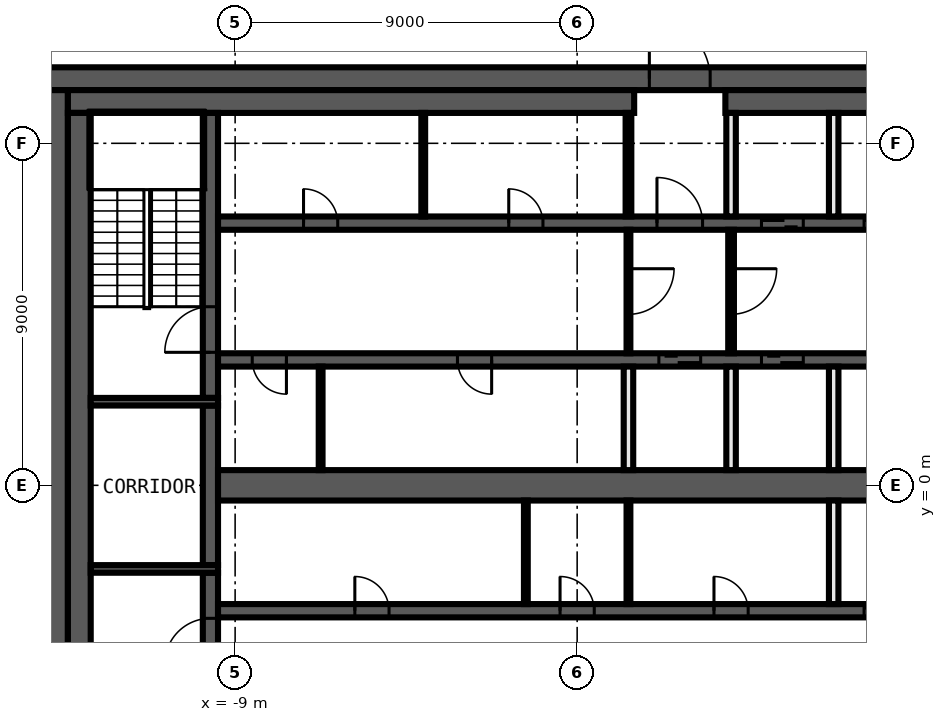
"""IFC4 building model, lengths in metres.
Left out: names, types, materials, properties, quantities, classifications, styles, units other than length and angle.
Written with IfcOpenShell. Run it as: python <this file> out.ifc"""

import sys

from ifc_helpers import new_model, si_unit, direction, frame, frame_2d, origin, place, context, subcontext, project, spatial, rectangle, extrude, element, fill, save


model = new_model("IFC4")
c1 = context("Model", 3, precision=1e-05, world=origin(), true_north=direction((0.0, 1.0)))
c2 = subcontext(c1, "Body", "Model", "MODEL_VIEW")
j1 = project(units=[si_unit("LENGTHUNIT", "METRE"), si_unit("PLANEANGLEUNIT", "RADIAN")], contexts=[c1])
p1 = place(None, origin())
s1 = spatial("IfcSite", under=j1, at=p1, CompositionType="ELEMENT")
p2 = place(p1, origin())
s2 = spatial("IfcBuilding", under=s1, at=p2, CompositionType="ELEMENT")
p3 = place(p2, frame((0.0, 0.0, 359.0)))
s3 = spatial("IfcBuildingStorey", under=s2, at=p3, CompositionType="ELEMENT", Elevation=359.0)
p4 = place(p3, frame((-11.138, 20.28, 0.0), z_axis=(0.0, 0.0, 1.0), x_axis=(-0.441342255748, -0.897338850876, 0.0)))
e1 = element("IfcWall", 1, at=p4, inside=s3, PredefinedType="SOLIDWALL", context=c2, shape_type="SweptSolid", body=[
    extrude(rectangle(XDim=28.805, YDim=0.25, at=frame_2d((14.403, 0.0))), origin(), (0.0, 0.0, 1.0), 3.8),
])
p5 = place(p3, frame((-14.0, 10.7, 0.0), z_axis=(0.0, 0.0, 1.0), x_axis=(1.0, 0.0, 0.0)))
e2 = element("IfcWall", 2, at=p5, inside=s3, PredefinedType="SHEAR", context=c2, shape_type="SweptSolid", body=[
    extrude(rectangle(XDim=28.0, YDim=0.6, at=frame_2d((14.0, 0.0))), origin(), (0.0, 0.0, 1.0), 3.8),
])
p6 = place(p5, frame((15.9, 0.0, 0.0)))
e3 = element("IfcOpeningElement", 3, at=p6, cuts=e2, PredefinedType="OPENING", context=c2, shape_type="SweptSolid", body=[
    extrude(rectangle(XDim=1.6, YDim=2.1, at=frame_2d((0.8, 1.05))), frame((0.0, 0.31, 0.0), z_axis=(0.0, -1.0, 0.0), x_axis=(1.0, 0.0, 0.0)), (0.0, 0.0, 1.0), 0.62),
])
p7 = place(p3, frame((-13.7, -10.4, 0.0), z_axis=(0.0, 0.0, 1.0), x_axis=(0.0, 1.0, 0.0)))
e4 = element("IfcWall", 4, at=p7, inside=s3, PredefinedType="SHEAR", context=c2, shape_type="SweptSolid", body=[
    extrude(rectangle(XDim=20.8, YDim=0.6, at=frame_2d((10.4, 0.0))), origin(), (0.0, 0.0, 1.0), 3.8),
])
p8 = place(p3, frame((-13.4, 10.1, 0.0), z_axis=(0.0, 0.0, 1.0), x_axis=(1.0, 0.0, 0.0)))
e5 = element("IfcWall", 5, at=p8, inside=s3, PredefinedType="SHEAR", context=c2, shape_type="SweptSolid", body=[
    extrude(rectangle(XDim=14.9, YDim=0.6, at=frame_2d((7.45, 0.0))), origin(), (0.0, 0.0, 1.0), 3.8),
])
p9 = place(p3, frame((3.9, 10.1, 0.0), z_axis=(0.0, 0.0, 1.0), x_axis=(1.0, 0.0, 0.0)))
e6 = element("IfcWall", 6, at=p9, inside=s3, PredefinedType="SHEAR", context=c2, shape_type="SweptSolid", body=[
    extrude(rectangle(XDim=9.5, YDim=0.6, at=frame_2d((4.75, 0.0))), origin(), (0.0, 0.0, 1.0), 3.8),
])
p10 = place(p3, frame((-13.1, -9.8, 0.0), z_axis=(0.0, 0.0, 1.0), x_axis=(0.0, 1.0, 0.0)))
e7 = element("IfcWall", 7, at=p10, inside=s3, PredefinedType="SHEAR", context=c2, shape_type="SweptSolid", body=[
    extrude(rectangle(XDim=19.6, YDim=0.6, at=frame_2d((9.8, 0.0))), origin(), (0.0, 0.0, 1.0), 3.8),
])
p11 = place(p3, frame((-9.65, -9.8, 0.0), z_axis=(0.0, 0.0, 1.0), x_axis=(0.0, 1.0, 0.0)))
e8 = element("IfcWall", 8, at=p11, inside=s3, PredefinedType="SHEAR", context=c2, shape_type="SweptSolid", body=[
    extrude(rectangle(XDim=7.5, YDim=0.4, at=frame_2d((3.75, 0.0))), origin(), (0.0, 0.0, 1.0), 3.8),
])
p12 = place(p11, frame((5.1, 0.0, 0.0)))
e9 = element("IfcOpeningElement", 9, at=p12, cuts=e8, PredefinedType="OPENING", context=c2, shape_type="SweptSolid", body=[
    extrude(rectangle(XDim=1.2, YDim=2.1, at=frame_2d((0.6, 1.05))), frame((0.0, 0.21, 0.0), z_axis=(0.0, -1.0, 0.0), x_axis=(1.0, 0.0, 0.0)), (0.0, 0.0, 1.0), 0.42),
])
p13 = place(p3, frame((-9.65, -2.1, 0.0), z_axis=(0.0, 0.0, 1.0), x_axis=(0.0, 1.0, 0.0)))
e10 = element("IfcWall", 10, at=p13, inside=s3, PredefinedType="SHEAR", context=c2, shape_type="SweptSolid", body=[
    extrude(rectangle(XDim=4.2, YDim=0.4, at=frame_2d((2.1, 0.0))), origin(), (0.0, 0.0, 1.0), 3.8),
])
p14 = place(p3, frame((-9.65, 2.3, 0.0), z_axis=(0.0, 0.0, 1.0), x_axis=(0.0, 1.0, 0.0)))
e11 = element("IfcWall", 11, at=p14, inside=s3, PredefinedType="SHEAR", context=c2, shape_type="SweptSolid", body=[
    extrude(rectangle(XDim=7.5, YDim=0.4, at=frame_2d((3.75, 0.0))), origin(), (0.0, 0.0, 1.0), 3.8),
])
p15 = place(p14, frame((1.2, 0.0, 0.0)))
e12 = element("IfcOpeningElement", 12, at=p15, cuts=e11, PredefinedType="OPENING", context=c2, shape_type="SweptSolid", body=[
    extrude(rectangle(XDim=1.2, YDim=2.1, at=frame_2d((0.6, 1.05))), frame((0.0, 0.21, 0.0), z_axis=(0.0, -1.0, 0.0), x_axis=(1.0, 0.0, 0.0)), (0.0, 0.0, 1.0), 0.42),
])
for number, where, z_axis, x_axis in (
    (13, (-9.45, 2.2, 0.0), (0.0, 0.0, 1.0), (-1.0, 0.0, 0.0)),
    (14, (-9.45, -2.2, 0.0), (0.0, 0.0, 1.0), (-1.0, 0.0, 0.0)),
):
    element("IfcWall", number, at=place(p3, frame(where, z_axis=z_axis, x_axis=x_axis)), inside=s3, PredefinedType="SHEAR", context=c2, shape_type="SweptSolid", body=[
        extrude(rectangle(XDim=3.35, YDim=0.2, at=frame_2d((1.675, 0.0))), origin(), (0.0, 0.0, 1.0), 3.8),
    ])
p16 = place(p3, frame((-9.45, 6.9, 0.0), z_axis=(0.0, 0.0, 1.0), x_axis=(1.0, 0.0, 0.0)))
e15 = element("IfcWall", 15, at=p16, inside=s3, PredefinedType="SHEAR", context=c2, shape_type="SweptSolid", body=[
    extrude(rectangle(XDim=18.9, YDim=0.35, at=frame_2d((9.45, 0.0))), origin(), (0.0, 0.0, 1.0), 3.8),
])
p17 = place(p16, frame((11.55, 0.0, 0.0)))
e16 = element("IfcOpeningElement", 16, at=p17, cuts=e15, PredefinedType="OPENING", context=c2, shape_type="SweptSolid", body=[
    extrude(rectangle(XDim=1.2, YDim=2.1, at=frame_2d((0.6, 1.05))), frame((0.0, 0.185, 0.0), z_axis=(0.0, -1.0, 0.0), x_axis=(1.0, 0.0, 0.0)), (0.0, 0.0, 1.0), 0.37),
])
p18 = place(p16, frame((14.3, 0.0, 0.0)))
e17 = element("IfcOpeningElement", 17, at=p18, cuts=e15, PredefinedType="OPENING", context=c2, shape_type="SweptSolid", body=[
    extrude(rectangle(XDim=1.1, YDim=2.1, at=frame_2d((0.55, 1.05))), frame((0.0, 0.185, 0.0), z_axis=(0.0, -1.0, 0.0), x_axis=(1.0, 0.0, 0.0)), (0.0, 0.0, 1.0), 0.37),
])
p19 = place(p16, frame((17.0, 0.0, 0.0)))
e18 = element("IfcOpeningElement", 18, at=p19, cuts=e15, PredefinedType="OPENING", context=c2, shape_type="SweptSolid", body=[
    extrude(rectangle(XDim=1.1, YDim=2.1, at=frame_2d((0.55, 1.05))), frame((0.0, 0.185, 0.0), z_axis=(0.0, -1.0, 0.0), x_axis=(1.0, 0.0, 0.0)), (0.0, 0.0, 1.0), 0.37),
])
p20 = place(p16, frame((2.25, 0.0, 0.0)))
e19 = element("IfcOpeningElement", 19, at=p20, cuts=e15, PredefinedType="OPENING", context=c2, shape_type="SweptSolid", body=[
    extrude(rectangle(XDim=0.9, YDim=2.1, at=frame_2d((0.45, 1.05))), frame((0.0, 0.185, 0.0), z_axis=(0.0, -1.0, 0.0), x_axis=(1.0, 0.0, 0.0)), (0.0, 0.0, 1.0), 0.37),
])
p21 = place(p16, frame((7.65, 0.0, 0.0)))
e20 = element("IfcOpeningElement", 20, at=p21, cuts=e15, PredefinedType="OPENING", context=c2, shape_type="SweptSolid", body=[
    extrude(rectangle(XDim=0.9, YDim=2.1, at=frame_2d((0.45, 1.05))), frame((0.0, 0.185, 0.0), z_axis=(0.0, -1.0, 0.0), x_axis=(1.0, 0.0, 0.0)), (0.0, 0.0, 1.0), 0.37),
])
p22 = place(p3, frame((9.45, 3.3, 0.0), z_axis=(0.0, 0.0, 1.0), x_axis=(-1.0, 0.0, 0.0)))
e21 = element("IfcWall", 21, at=p22, inside=s3, PredefinedType="SHEAR", context=c2, shape_type="SweptSolid", body=[
    extrude(rectangle(XDim=18.9, YDim=0.35, at=frame_2d((9.45, 0.0))), origin(), (0.0, 0.0, 1.0), 3.8),
])
p23 = place(p22, frame((6.2, 0.0, 0.0)))
e22 = element("IfcOpeningElement", 22, at=p23, cuts=e21, PredefinedType="OPENING", context=c2, shape_type="SweptSolid", body=[
    extrude(rectangle(XDim=1.1, YDim=2.1, at=frame_2d((0.55, 1.05))), frame((0.0, 0.185, 0.0), z_axis=(0.0, -1.0, 0.0), x_axis=(1.0, 0.0, 0.0)), (0.0, 0.0, 1.0), 0.37),
])
p24 = place(p22, frame((3.5, 0.0, 0.0)))
e23 = element("IfcOpeningElement", 23, at=p24, cuts=e21, PredefinedType="OPENING", context=c2, shape_type="SweptSolid", body=[
    extrude(rectangle(XDim=1.1, YDim=2.1, at=frame_2d((0.55, 1.05))), frame((0.0, 0.185, 0.0), z_axis=(0.0, -1.0, 0.0), x_axis=(1.0, 0.0, 0.0)), (0.0, 0.0, 1.0), 0.37),
])
p25 = place(p22, frame((0.9, 0.0, 0.0)))
e24 = element("IfcOpeningElement", 24, at=p25, cuts=e21, PredefinedType="OPENING", context=c2, shape_type="SweptSolid", body=[
    extrude(rectangle(XDim=0.9, YDim=2.1, at=frame_2d((0.45, 1.05))), frame((0.0, 0.185, 0.0), z_axis=(0.0, -1.0, 0.0), x_axis=(1.0, 0.0, 0.0)), (0.0, 0.0, 1.0), 0.37),
])
p26 = place(p22, frame((17.1, 0.0, 0.0)))
e25 = element("IfcOpeningElement", 25, at=p26, cuts=e21, PredefinedType="OPENING", context=c2, shape_type="SweptSolid", body=[
    extrude(rectangle(XDim=0.9, YDim=2.1, at=frame_2d((0.45, 1.05))), frame((0.0, 0.185, 0.0), z_axis=(0.0, -1.0, 0.0), x_axis=(1.0, 0.0, 0.0)), (0.0, 0.0, 1.0), 0.37),
])
p27 = place(p22, frame((11.7, 0.0, 0.0)))
e26 = element("IfcOpeningElement", 26, at=p27, cuts=e21, PredefinedType="OPENING", context=c2, shape_type="SweptSolid", body=[
    extrude(rectangle(XDim=0.9, YDim=2.1, at=frame_2d((0.45, 1.05))), frame((0.0, 0.185, 0.0), z_axis=(0.0, -1.0, 0.0), x_axis=(1.0, 0.0, 0.0)), (0.0, 0.0, 1.0), 0.37),
])
p28 = place(p3, frame((-9.45, -3.3, 0.0), z_axis=(0.0, 0.0, 1.0), x_axis=(1.0, 0.0, 0.0)))
e27 = element("IfcWall", 27, at=p28, inside=s3, PredefinedType="SHEAR", context=c2, shape_type="SweptSolid", body=[
    extrude(rectangle(XDim=18.9, YDim=0.35, at=frame_2d((9.45, 0.0))), origin(), (0.0, 0.0, 1.0), 3.8),
])
p29 = place(p28, frame((17.0, 0.0, 0.0)))
e28 = element("IfcOpeningElement", 28, at=p29, cuts=e27, PredefinedType="OPENING", context=c2, shape_type="SweptSolid", body=[
    extrude(rectangle(XDim=1.1, YDim=2.1, at=frame_2d((0.55, 1.05))), frame((0.0, 0.185, 0.0), z_axis=(0.0, -1.0, 0.0), x_axis=(1.0, 0.0, 0.0)), (0.0, 0.0, 1.0), 0.37),
])
p30 = place(p28, frame((3.6, 0.0, 0.0)))
e29 = element("IfcOpeningElement", 29, at=p30, cuts=e27, PredefinedType="OPENING", context=c2, shape_type="SweptSolid", body=[
    extrude(rectangle(XDim=0.9, YDim=2.1, at=frame_2d((0.45, 1.05))), frame((0.0, 0.185, 0.0), z_axis=(0.0, -1.0, 0.0), x_axis=(1.0, 0.0, 0.0)), (0.0, 0.0, 1.0), 0.37),
])
p31 = place(p28, frame((9.0, 0.0, 0.0)))
e30 = element("IfcOpeningElement", 30, at=p31, cuts=e27, PredefinedType="OPENING", context=c2, shape_type="SweptSolid", body=[
    extrude(rectangle(XDim=0.9, YDim=2.1, at=frame_2d((0.45, 1.05))), frame((0.0, 0.185, 0.0), z_axis=(0.0, -1.0, 0.0), x_axis=(1.0, 0.0, 0.0)), (0.0, 0.0, 1.0), 0.37),
])
p32 = place(p28, frame((13.05, 0.0, 0.0)))
e31 = element("IfcOpeningElement", 31, at=p32, cuts=e27, PredefinedType="OPENING", context=c2, shape_type="SweptSolid", body=[
    extrude(rectangle(XDim=0.9, YDim=2.1, at=frame_2d((0.45, 1.05))), frame((0.0, 0.185, 0.0), z_axis=(0.0, -1.0, 0.0), x_axis=(1.0, 0.0, 0.0)), (0.0, 0.0, 1.0), 0.37),
])
p33 = place(p3, frame((-9.45, 0.0, 0.0), z_axis=(0.0, 0.0, 1.0), x_axis=(1.0, 0.0, 0.0)))
e32 = element("IfcWall", 32, at=p33, inside=s3, PredefinedType="SHEAR", context=c2, shape_type="SweptSolid", body=[
    extrude(rectangle(XDim=18.9, YDim=0.8, at=frame_2d((9.45, 0.0))), origin(), (0.0, 0.0, 1.0), 3.8),
])
for number, where, z_axis, x_axis in (
    (33, (6.75, -3.125, 0.0), (0.0, 0.0, 1.0), (0.0, 1.0, 0.0)),
    (34, (6.75, 0.4, 0.0), (0.0, 0.0, 1.0), (0.0, 1.0, 0.0)),
    (35, (6.75, 7.075, 0.0), (0.0, 0.0, 1.0), (0.0, 1.0, 0.0)),
):
    element("IfcWall", number, at=place(p3, frame(where, z_axis=z_axis, x_axis=x_axis)), inside=s3, PredefinedType="SOLIDWALL", context=c2, shape_type="SweptSolid", body=[
        extrude(rectangle(XDim=2.725, YDim=0.25, at=frame_2d((1.363, 0.0))), origin(), (0.0, 0.0, 1.0), 3.8),
    ])
p34 = place(p3, frame((4.05, 6.725, 0.0), z_axis=(0.0, 0.0, 1.0), x_axis=(0.0, -1.0, 0.0)))
e36 = element("IfcWall", 36, at=p34, inside=s3, PredefinedType="PARTITIONING", context=c2, shape_type="SweptSolid", body=[
    extrude(rectangle(XDim=3.25, YDim=0.15, at=frame_2d((1.625, 0.0))), origin(), (0.0, 0.0, 1.0), 3.8),
])
p35 = place(p34, frame((1.025, 0.0, 0.0)))
e37 = element("IfcOpeningElement", 37, at=p35, cuts=e36, PredefinedType="OPENING", context=c2, shape_type="SweptSolid", body=[
    extrude(rectangle(XDim=1.2, YDim=2.1, at=frame_2d((0.6, 1.05))), frame((0.0, 0.085, 0.0), z_axis=(0.0, -1.0, 0.0), x_axis=(1.0, 0.0, 0.0)), (0.0, 0.0, 1.0), 0.17),
])
for number, where, z_axis, x_axis in (
    (38, (4.05, 0.4, 0.0), (0.0, 0.0, 1.0), (0.0, 1.0, 0.0)),
    (39, (4.05, 7.075, 0.0), (0.0, 0.0, 1.0), (0.0, 1.0, 0.0)),
):
    element("IfcWall", number, at=place(p3, frame(where, z_axis=z_axis, x_axis=x_axis)), inside=s3, PredefinedType="SOLIDWALL", context=c2, shape_type="SweptSolid", body=[
        extrude(rectangle(XDim=2.725, YDim=0.25, at=frame_2d((1.363, 0.0))), origin(), (0.0, 0.0, 1.0), 3.8),
    ])
p36 = place(p3, frame((1.35, 7.075, 0.0), z_axis=(0.0, 0.0, 1.0), x_axis=(0.0, 1.0, 0.0)))
e40 = element("IfcWall", 40, at=p36, inside=s3, PredefinedType="PARTITIONING", context=c2, shape_type="SweptSolid", body=[
    extrude(rectangle(XDim=2.725, YDim=0.15, at=frame_2d((1.363, 0.0))), origin(), (0.0, 0.0, 1.0), 3.8),
])
p37 = place(p3, frame((1.35, -3.125, 0.0), z_axis=(0.0, 0.0, 1.0), x_axis=(0.0, 1.0, 0.0)))
e41 = element("IfcWall", 41, at=p37, inside=s3, PredefinedType="PARTITIONING", context=c2, shape_type="SweptSolid", body=[
    extrude(rectangle(XDim=2.725, YDim=0.1, at=frame_2d((1.363, 0.0))), origin(), (0.0, 0.0, 1.0), 3.8),
])
p38 = place(p3, frame((1.35, 6.725, 0.0), z_axis=(0.0, 0.0, 1.0), x_axis=(0.0, -1.0, 0.0)))
e42 = element("IfcWall", 42, at=p38, inside=s3, PredefinedType="PARTITIONING", context=c2, shape_type="SweptSolid", body=[
    extrude(rectangle(XDim=3.25, YDim=0.1, at=frame_2d((1.625, 0.0))), origin(), (0.0, 0.0, 1.0), 3.8),
])
p39 = place(p38, frame((1.025, 0.0, 0.0)))
e43 = element("IfcOpeningElement", 43, at=p39, cuts=e42, PredefinedType="OPENING", context=c2, shape_type="SweptSolid", body=[
    extrude(rectangle(XDim=1.2, YDim=2.1, at=frame_2d((0.6, 1.05))), frame((0.0, 0.06, 0.0), z_axis=(0.0, -1.0, 0.0), x_axis=(1.0, 0.0, 0.0)), (0.0, 0.0, 1.0), 0.12),
])
p40 = place(p3, frame((1.35, 0.4, 0.0), z_axis=(0.0, 0.0, 1.0), x_axis=(0.0, 1.0, 0.0)))
e44 = element("IfcWall", 44, at=p40, inside=s3, PredefinedType="SOLIDWALL", context=c2, shape_type="SweptSolid", body=[
    extrude(rectangle(XDim=2.725, YDim=0.25, at=frame_2d((1.363, 0.0))), origin(), (0.0, 0.0, 1.0), 3.8),
])
for number, where, z_axis, x_axis in (
    (45, (-1.35, -3.125, 0.0), (0.0, 0.0, 1.0), (0.0, 1.0, 0.0)),
    (46, (-4.05, 7.075, 0.0), (0.0, 0.0, 1.0), (0.0, 1.0, 0.0)),
    (47, (-6.75, 0.4, 0.0), (0.0, 0.0, 1.0), (0.0, 1.0, 0.0)),
):
    element("IfcWall", number, at=place(p3, frame(where, z_axis=z_axis, x_axis=x_axis)), inside=s3, PredefinedType="PARTITIONING", context=c2, shape_type="SweptSolid", body=[
        extrude(rectangle(XDim=2.725, YDim=0.1, at=frame_2d((1.363, 0.0))), origin(), (0.0, 0.0, 1.0), 3.8),
    ])
p41 = place(p6, origin())
e48 = element("IfcDoor", 48, at=p41, inside=s3, OperationType="DOUBLE_DOOR_SINGLE_SWING", PredefinedType="DOOR", context=c2, shape_type="SweptSolid", body=[
    extrude(rectangle(XDim=1.6, YDim=2.1, at=frame_2d((0.8, 1.05))), frame((0.0, 0.025, 0.0), z_axis=(0.0, -1.0, 0.0), x_axis=(1.0, 0.0, 0.0)), (0.0, 0.0, 1.0), 0.05),
])
fill(e3, e48)
p42 = place(p17, origin())
e49 = element("IfcDoor", 49, at=p42, inside=s3, OperationType="SINGLE_SWING_LEFT", PredefinedType="DOOR", context=c2, shape_type="SweptSolid", body=[
    extrude(rectangle(XDim=1.2, YDim=2.1, at=frame_2d((0.6, 1.05))), frame((0.0, 0.025, 0.0), z_axis=(0.0, -1.0, 0.0), x_axis=(1.0, 0.0, 0.0)), (0.0, 0.0, 1.0), 0.05),
])
fill(e16, e49)
p43 = place(p18, origin())
e50 = element("IfcDoor", 50, at=p43, inside=s3, OperationType="DOUBLE_DOOR_SLIDING", PredefinedType="DOOR", context=c2, shape_type="SweptSolid", body=[
    extrude(rectangle(XDim=1.1, YDim=2.1, at=frame_2d((0.55, 1.05))), frame((0.0, 0.025, 0.0), z_axis=(0.0, -1.0, 0.0), x_axis=(1.0, 0.0, 0.0)), (0.0, 0.0, 1.0), 0.05),
])
fill(e17, e50)
p44 = place(p19, origin())
e51 = element("IfcDoor", 51, at=p44, inside=s3, OperationType="DOUBLE_DOOR_SLIDING", PredefinedType="DOOR", context=c2, shape_type="SweptSolid", body=[
    extrude(rectangle(XDim=1.1, YDim=2.1, at=frame_2d((0.55, 1.05))), frame((0.0, 0.025, 0.0), z_axis=(0.0, -1.0, 0.0), x_axis=(1.0, 0.0, 0.0)), (0.0, 0.0, 1.0), 0.05),
])
fill(e18, e51)
p45 = place(p23, origin())
e52 = element("IfcDoor", 52, at=p45, inside=s3, OperationType="DOUBLE_DOOR_SLIDING", PredefinedType="DOOR", context=c2, shape_type="SweptSolid", body=[
    extrude(rectangle(XDim=1.1, YDim=2.1, at=frame_2d((0.55, 1.05))), frame((0.0, 0.025, 0.0), z_axis=(0.0, -1.0, 0.0), x_axis=(1.0, 0.0, 0.0)), (0.0, 0.0, 1.0), 0.05),
])
fill(e22, e52)
p46 = place(p24, origin())
e53 = element("IfcDoor", 53, at=p46, inside=s3, OperationType="DOUBLE_DOOR_SLIDING", PredefinedType="DOOR", context=c2, shape_type="SweptSolid", body=[
    extrude(rectangle(XDim=1.1, YDim=2.1, at=frame_2d((0.55, 1.05))), frame((0.0, 0.025, 0.0), z_axis=(0.0, -1.0, 0.0), x_axis=(1.0, 0.0, 0.0)), (0.0, 0.0, 1.0), 0.05),
])
fill(e23, e53)
p47 = place(p29, origin())
e54 = element("IfcDoor", 54, at=p47, inside=s3, OperationType="DOUBLE_DOOR_SLIDING", PredefinedType="DOOR", context=c2, shape_type="SweptSolid", body=[
    extrude(rectangle(XDim=1.1, YDim=2.1, at=frame_2d((0.55, 1.05))), frame((0.0, 0.025, 0.0), z_axis=(0.0, -1.0, 0.0), x_axis=(1.0, 0.0, 0.0)), (0.0, 0.0, 1.0), 0.05),
])
fill(e28, e54)
p48 = place(p20, origin())
e55 = element("IfcDoor", 55, at=p48, inside=s3, OperationType="SINGLE_SWING_RIGHT", PredefinedType="DOOR", context=c2, shape_type="SweptSolid", body=[
    extrude(rectangle(XDim=0.9, YDim=2.1, at=frame_2d((0.45, 1.05))), frame((0.0, 0.025, 0.0), z_axis=(0.0, -1.0, 0.0), x_axis=(1.0, 0.0, 0.0)), (0.0, 0.0, 1.0), 0.05),
])
fill(e19, e55)
p49 = place(p21, origin())
e56 = element("IfcDoor", 56, at=p49, inside=s3, OperationType="SINGLE_SWING_LEFT", PredefinedType="DOOR", context=c2, shape_type="SweptSolid", body=[
    extrude(rectangle(XDim=0.9, YDim=2.1, at=frame_2d((0.45, 1.05))), frame((0.0, 0.025, 0.0), z_axis=(0.0, -1.0, 0.0), x_axis=(1.0, 0.0, 0.0)), (0.0, 0.0, 1.0), 0.05),
])
fill(e20, e56)
p50 = place(p26, origin())
e57 = element("IfcDoor", 57, at=p50, inside=s3, OperationType="SINGLE_SWING_RIGHT", PredefinedType="DOOR", context=c2, shape_type="SweptSolid", body=[
    extrude(rectangle(XDim=0.9, YDim=2.1, at=frame_2d((0.45, 1.05))), frame((0.0, 0.025, 0.0), z_axis=(0.0, -1.0, 0.0), x_axis=(1.0, 0.0, 0.0)), (0.0, 0.0, 1.0), 0.05),
])
fill(e25, e57)
p51 = place(p27, origin())
e58 = element("IfcDoor", 58, at=p51, inside=s3, OperationType="SINGLE_SWING_LEFT", PredefinedType="DOOR", context=c2, shape_type="SweptSolid", body=[
    extrude(rectangle(XDim=0.9, YDim=2.1, at=frame_2d((0.45, 1.05))), frame((0.0, 0.025, 0.0), z_axis=(0.0, -1.0, 0.0), x_axis=(1.0, 0.0, 0.0)), (0.0, 0.0, 1.0), 0.05),
])
fill(e26, e58)
p52 = place(p30, origin())
e59 = element("IfcDoor", 59, at=p52, inside=s3, OperationType="SINGLE_SWING_RIGHT", PredefinedType="DOOR", context=c2, shape_type="SweptSolid", body=[
    extrude(rectangle(XDim=0.9, YDim=2.1, at=frame_2d((0.45, 1.05))), frame((0.0, 0.025, 0.0), z_axis=(0.0, -1.0, 0.0), x_axis=(1.0, 0.0, 0.0)), (0.0, 0.0, 1.0), 0.05),
])
fill(e29, e59)
p53 = place(p31, origin())
e60 = element("IfcDoor", 60, at=p53, inside=s3, OperationType="SINGLE_SWING_LEFT", PredefinedType="DOOR", context=c2, shape_type="SweptSolid", body=[
    extrude(rectangle(XDim=0.9, YDim=2.1, at=frame_2d((0.45, 1.05))), frame((0.0, 0.025, 0.0), z_axis=(0.0, -1.0, 0.0), x_axis=(1.0, 0.0, 0.0)), (0.0, 0.0, 1.0), 0.05),
])
fill(e30, e60)
p54 = place(p32, origin())
e61 = element("IfcDoor", 61, at=p54, inside=s3, OperationType="SINGLE_SWING_RIGHT", PredefinedType="DOOR", context=c2, shape_type="SweptSolid", body=[
    extrude(rectangle(XDim=0.9, YDim=2.1, at=frame_2d((0.45, 1.05))), frame((0.0, 0.025, 0.0), z_axis=(0.0, -1.0, 0.0), x_axis=(1.0, 0.0, 0.0)), (0.0, 0.0, 1.0), 0.05),
])
fill(e31, e61)
p55 = place(p15, origin())
e62 = element("IfcDoor", 62, at=p55, inside=s3, OperationType="SINGLE_SWING_RIGHT", PredefinedType="DOOR", context=c2, shape_type="SweptSolid", body=[
    extrude(rectangle(XDim=1.2, YDim=2.1, at=frame_2d((0.6, 1.05))), frame((0.0, 0.025, 0.0), z_axis=(0.0, -1.0, 0.0), x_axis=(1.0, 0.0, 0.0)), (0.0, 0.0, 1.0), 0.05),
])
fill(e12, e62)
p56 = place(p12, origin())
e63 = element("IfcDoor", 63, at=p56, inside=s3, OperationType="SINGLE_SWING_LEFT", PredefinedType="DOOR", context=c2, shape_type="SweptSolid", body=[
    extrude(rectangle(XDim=1.2, YDim=2.1, at=frame_2d((0.6, 1.05))), frame((0.0, 0.025, 0.0), z_axis=(0.0, -1.0, 0.0), x_axis=(1.0, 0.0, 0.0)), (0.0, 0.0, 1.0), 0.05),
])
fill(e9, e63)
p57 = place(p39, origin())
e64 = element("IfcDoor", 64, at=p57, inside=s3, OperationType="SINGLE_SWING_LEFT", PredefinedType="DOOR", context=c2, shape_type="SweptSolid", body=[
    extrude(rectangle(XDim=1.2, YDim=2.1, at=frame_2d((0.6, 1.05))), frame((0.0, 0.025, 0.0), z_axis=(0.0, -1.0, 0.0), x_axis=(1.0, 0.0, 0.0)), (0.0, 0.0, 1.0), 0.05),
])
fill(e43, e64)
p58 = place(p35, origin())
e65 = element("IfcDoor", 65, at=p58, inside=s3, OperationType="SINGLE_SWING_RIGHT", PredefinedType="DOOR", context=c2, shape_type="SweptSolid", body=[
    extrude(rectangle(XDim=1.2, YDim=2.1, at=frame_2d((0.6, 1.05))), frame((0.0, 0.025, 0.0), z_axis=(0.0, -1.0, 0.0), x_axis=(1.0, 0.0, 0.0)), (0.0, 0.0, 1.0), 0.05),
])
fill(e37, e65)
save(model, sys.argv[1])
